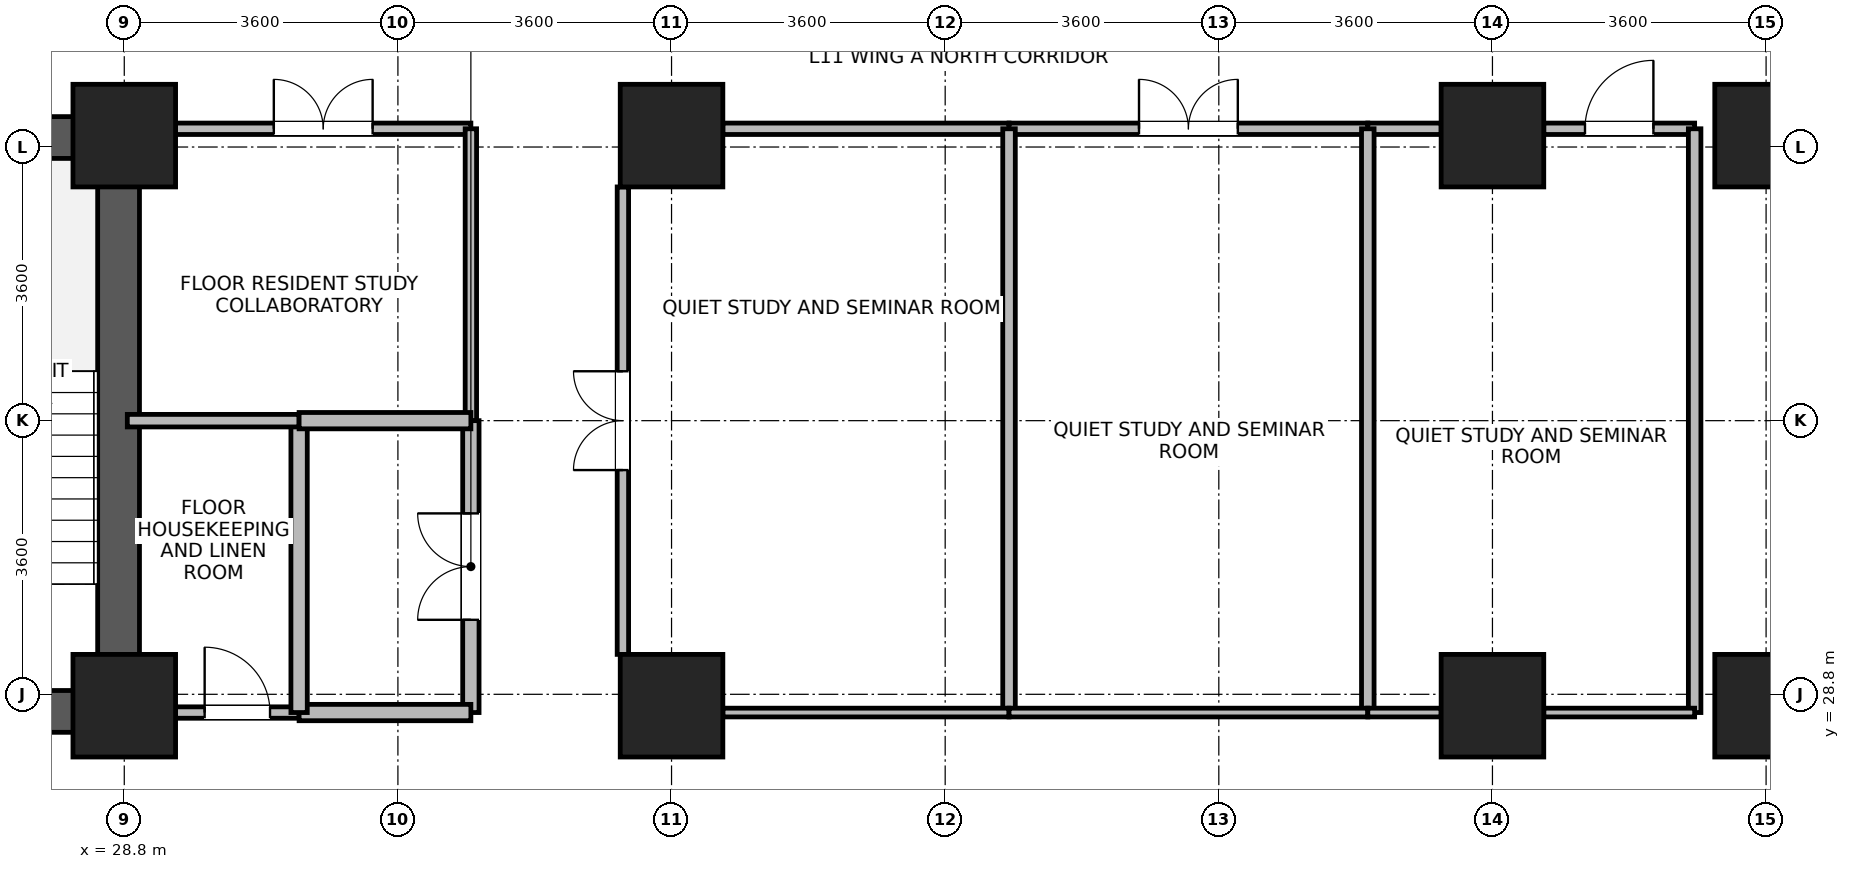
"""IFC4 building model, lengths in metres.
Left out: names, types, materials, properties, quantities, classifications, styles, units other than length and angle.
Written with IfcOpenShell. Run it as: python <this file> out.ifc"""

import sys

from ifc_helpers import new_model, si_unit, direction, frame, frame_2d, origin, origin_2d, place, context, subcontext, project, spatial, rectangle, extrude, source, transform, mapped, element, fill, save


model = new_model("IFC4")
c1 = context("Model", 3, precision=1e-05, world=origin(), true_north=direction((0.0, 1.0)))
c2 = subcontext(c1, "Body", "Model", "MODEL_VIEW")
j1 = project(units=[si_unit("LENGTHUNIT", "METRE"), si_unit("PLANEANGLEUNIT", "RADIAN")], contexts=[c1])
p1 = place(None, origin())
s1 = spatial("IfcSite", under=j1, at=p1, CompositionType="ELEMENT")
p2 = place(p1, origin())
s2 = spatial("IfcBuilding", under=s1, at=p2, CompositionType="ELEMENT")
p3 = place(p2, frame((0.0, 0.0, 47.5)))
s3 = spatial("IfcBuildingStorey", under=s2, at=p3, CompositionType="ELEMENT", Elevation=47.5)
p4 = place(p3, frame((28.725, 28.3, 0.0), z_axis=(0.0, 0.0, 1.0), x_axis=(0.0, 1.0, 0.0)))
e1 = element("IfcWall", 1, at=p4, inside=s3, PredefinedType="SHEAR", context=c2, shape_type="SweptSolid", body=[
    extrude(rectangle(XDim=8.1, YDim=0.55, at=frame_2d((4.05, 0.0))), origin(), (0.0, 0.0, 1.0), 3.45),
])
for number, where, z_axis, x_axis in (
    (2, (25.25, 28.575, 0.0), (0.0, 0.0, 1.0), (1.0, 0.0, 0.0)),
    (3, (25.25, 36.125, 0.0), (0.0, 0.0, 1.0), (1.0, 0.0, 0.0)),
):
    element("IfcWall", number, at=place(p3, frame(where, z_axis=z_axis, x_axis=x_axis)), inside=s3, PredefinedType="SHEAR", context=c2, shape_type="SweptSolid", body=[
        extrude(rectangle(XDim=3.2, YDim=0.55, at=frame_2d((1.6, 0.0))), origin(), (0.0, 0.0, 1.0), 3.45),
    ])
m1 = source(origin(), c2, "Body", "SweptSolid", [
    extrude(rectangle(XDim=1.35, YDim=1.35, at=origin_2d()), origin(), (0.0, 0.0, 1.0), 3.7),
])
for number, where, z_axis, x_axis in (
    (4, (28.8, 28.65, 0.0), (0.0, 0.0, 1.0), (1.0, 0.0, 0.0)),
    (5, (28.8, 36.15, 0.0), (0.0, 0.0, 1.0), (1.0, 0.0, 0.0)),
    (6, (36.0, 28.65, 0.0), (0.0, 0.0, 1.0), (1.0, 0.0, 0.0)),
    (7, (36.0, 36.15, 0.0), (0.0, 0.0, 1.0), (1.0, 0.0, 0.0)),
    (8, (46.8, 28.65, 0.0), (0.0, 0.0, 1.0), (1.0, 0.0, 0.0)),
    (9, (46.8, 36.15, 0.0), (0.0, 0.0, 1.0), (1.0, 0.0, 0.0)),
    (10, (50.4, 28.65, 0.0), (0.0, 0.0, 1.0), (1.0, 0.0, 0.0)),
    (11, (50.4, 36.15, 0.0), (0.0, 0.0, 1.0), (1.0, 0.0, 0.0)),
):
    element("IfcColumn", number, at=place(p3, frame(where, z_axis=z_axis, x_axis=x_axis)), inside=s3, PredefinedType="COLUMN", context=c2, shape_type="MappedRepresentation", body=[
        mapped(m1, transform((0.0, 0.0, 0.0), x_axis=(1.0, 0.0, 0.0), y_axis=(0.0, 1.0, 0.0), z_axis=(0.0, 0.0, 1.0), scale=1.0)),
    ])
p5 = place(p3, frame((35.36, 29.325, 0.0), z_axis=(0.0, 0.0, 1.0), x_axis=(0.0, 1.0, 0.0)))
e12 = element("IfcWall", 12, at=p5, inside=s3, PredefinedType="PARTITIONING", context=c2, shape_type="SweptSolid", body=[
    extrude(rectangle(XDim=6.15, YDim=0.15, at=frame_2d((3.075, 0.0))), origin(), (0.0, 0.0, 1.0), 3.43),
])
p6 = place(p5, frame((2.425, 0.0, 0.0)))
e13 = element("IfcOpeningElement", 13, at=p6, cuts=e12, PredefinedType="OPENING", context=c2, shape_type="SweptSolid", body=[
    extrude(rectangle(XDim=1.3, YDim=2.12, at=frame_2d((0.65, 1.06))), frame((0.0, 0.085, 0.0), z_axis=(0.0, -1.0, 0.0), x_axis=(1.0, 0.0, 0.0)), (0.0, 0.0, 1.0), 0.17),
])
p7 = place(p3, frame((36.675, 36.24, 0.0), z_axis=(0.0, 0.0, 1.0), x_axis=(1.0, 0.0, 0.0)))
e14 = element("IfcWall", 14, at=p7, inside=s3, PredefinedType="PARTITIONING", context=c2, shape_type="SweptSolid", body=[
    extrude(rectangle(XDim=3.765, YDim=0.15, at=frame_2d((1.882, 0.0))), origin(), (0.0, 0.0, 1.0), 2.78),
])
p8 = place(p3, frame((40.44, 36.24, 0.0), z_axis=(0.0, 0.0, 1.0), x_axis=(1.0, 0.0, 0.0)))
e15 = element("IfcWall", 15, at=p8, inside=s3, PredefinedType="PARTITIONING", context=c2, shape_type="SweptSolid", body=[
    extrude(rectangle(XDim=4.72, YDim=0.15, at=frame_2d((2.36, 0.0))), origin(), (0.0, 0.0, 1.0), 2.78),
])
p9 = place(p8, frame((1.71, 0.0, 0.0)))
e16 = element("IfcOpeningElement", 16, at=p9, cuts=e15, PredefinedType="OPENING", context=c2, shape_type="SweptSolid", body=[
    extrude(rectangle(XDim=1.3, YDim=2.12, at=frame_2d((0.65, 1.06))), frame((0.0, 0.085, 0.0), z_axis=(0.0, -1.0, 0.0), x_axis=(1.0, 0.0, 0.0)), (0.0, 0.0, 1.0), 0.17),
])
p10 = place(p3, frame((29.475, 36.24, 0.0), z_axis=(0.0, 0.0, 1.0), x_axis=(1.0, 0.0, 0.0)))
e17 = element("IfcWall", 17, at=p10, inside=s3, PredefinedType="PARTITIONING", context=c2, shape_type="SweptSolid", body=[
    extrude(rectangle(XDim=3.885, YDim=0.15, at=frame_2d((1.942, 0.0))), origin(), (0.0, 0.0, 1.0), 2.78),
])
p11 = place(p10, frame((1.292, 0.0, 0.0)))
e18 = element("IfcOpeningElement", 18, at=p11, cuts=e17, PredefinedType="OPENING", context=c2, shape_type="SweptSolid", body=[
    extrude(rectangle(XDim=1.3, YDim=2.12, at=frame_2d((0.65, 1.06))), frame((0.0, 0.085, 0.0), z_axis=(0.0, -1.0, 0.0), x_axis=(1.0, 0.0, 0.0)), (0.0, 0.0, 1.0), 0.17),
])
p12 = place(p3, frame((45.16, 36.24, 0.0), z_axis=(0.0, 0.0, 1.0), x_axis=(1.0, 0.0, 0.0)))
e19 = element("IfcWall", 19, at=p12, inside=s3, PredefinedType="PARTITIONING", context=c2, shape_type="SweptSolid", body=[
    extrude(rectangle(XDim=0.965, YDim=0.15, at=frame_2d((0.482, 0.0))), origin(), (0.0, 0.0, 1.0), 2.78),
])
p13 = place(p3, frame((47.475, 36.24, 0.0), z_axis=(0.0, 0.0, 1.0), x_axis=(1.0, 0.0, 0.0)))
e20 = element("IfcWall", 20, at=p13, inside=s3, PredefinedType="PARTITIONING", context=c2, shape_type="SweptSolid", body=[
    extrude(rectangle(XDim=1.985, YDim=0.15, at=frame_2d((0.992, 0.0))), origin(), (0.0, 0.0, 1.0), 2.78),
])
p14 = place(p13, frame((0.542, 0.0, 0.0)))
e21 = element("IfcOpeningElement", 21, at=p14, cuts=e20, PredefinedType="OPENING", context=c2, shape_type="SweptSolid", body=[
    extrude(rectangle(XDim=0.9, YDim=2.08, at=frame_2d((0.45, 1.04))), frame((0.0, 0.085, 0.0), z_axis=(0.0, -1.0, 0.0), x_axis=(1.0, 0.0, 0.0)), (0.0, 0.0, 1.0), 0.17),
])
p15 = place(p3, frame((33.36, 32.4, 0.0), z_axis=(0.0, 0.0, 1.0), x_axis=(0.0, 1.0, 0.0)))
e22 = element("IfcWall", 22, at=p15, inside=s3, PredefinedType="PARTITIONING", context=c2, shape_type="SweptSolid", body=[
    extrude(rectangle(XDim=3.84, YDim=0.15, at=frame_2d((1.92, 0.0))), origin(), (0.0, 0.0, 1.0), 3.43),
])
p16 = place(p3, frame((33.36, 28.56, 0.0), z_axis=(0.0, 0.0, 1.0), x_axis=(0.0, 1.0, 0.0)))
e23 = element("IfcWall", 23, at=p16, inside=s3, PredefinedType="PARTITIONING", context=c2, shape_type="SweptSolid", body=[
    extrude(rectangle(XDim=3.84, YDim=0.215, at=frame_2d((1.92, 0.0))), origin(), (0.0, 0.0, 1.0), 3.43),
])
p17 = place(p16, frame((1.22, 0.0, 0.0)))
e24 = element("IfcOpeningElement", 24, at=p17, cuts=e23, PredefinedType="OPENING", context=c2, shape_type="SweptSolid", body=[
    extrude(rectangle(XDim=1.4, YDim=2.15, at=frame_2d((0.7, 1.075))), frame((0.0, 0.118, 0.0), z_axis=(0.0, -1.0, 0.0), x_axis=(1.0, 0.0, 0.0)), (0.0, 0.0, 1.0), 0.235),
])
p18 = place(p3, frame((29.475, 28.56, 0.0), z_axis=(0.0, 0.0, 1.0), x_axis=(1.0, 0.0, 0.0)))
e25 = element("IfcWall", 25, at=p18, inside=s3, PredefinedType="PARTITIONING", context=c2, shape_type="SweptSolid", body=[
    extrude(rectangle(XDim=1.625, YDim=0.15, at=frame_2d((0.812, 0.0))), origin(), (0.0, 0.0, 1.0), 2.78),
])
p19 = place(p18, frame((0.383, 0.0, 0.0)))
e26 = element("IfcOpeningElement", 26, at=p19, cuts=e25, PredefinedType="OPENING", context=c2, shape_type="SweptSolid", body=[
    extrude(rectangle(XDim=0.86, YDim=2.02, at=frame_2d((0.43, 1.01))), frame((0.0, 0.085, 0.0), z_axis=(0.0, -1.0, 0.0), x_axis=(1.0, 0.0, 0.0)), (0.0, 0.0, 1.0), 0.17),
])
p20 = place(p3, frame((31.1, 28.56, 0.0), z_axis=(0.0, 0.0, 1.0), x_axis=(1.0, 0.0, 0.0)))
e27 = element("IfcWall", 27, at=p20, inside=s3, PredefinedType="PARTITIONING", context=c2, shape_type="SweptSolid", body=[
    extrude(rectangle(XDim=2.26, YDim=0.215, at=frame_2d((1.13, 0.0))), origin(), (0.0, 0.0, 1.0), 2.78),
])
for number, where, z_axis, x_axis in (
    (28, (40.44, 28.56, 0.0), (0.0, 0.0, 1.0), (0.0, 1.0, 0.0)),
    (29, (45.16, 28.56, 0.0), (0.0, 0.0, 1.0), (0.0, 1.0, 0.0)),
    (30, (49.46, 28.56, 0.0), (0.0, 0.0, 1.0), (0.0, 1.0, 0.0)),
):
    element("IfcWall", number, at=place(p3, frame(where, z_axis=z_axis, x_axis=x_axis)), inside=s3, PredefinedType="PARTITIONING", context=c2, shape_type="SweptSolid", body=[
        extrude(rectangle(XDim=7.68, YDim=0.165, at=frame_2d((3.84, 0.0))), origin(), (0.0, 0.0, 1.0), 3.43),
    ])
p21 = place(p3, frame((36.675, 28.56, 0.0), z_axis=(0.0, 0.0, 1.0), x_axis=(1.0, 0.0, 0.0)))
e31 = element("IfcWall", 31, at=p21, inside=s3, PredefinedType="PARTITIONING", context=c2, shape_type="SweptSolid", body=[
    extrude(rectangle(XDim=3.765, YDim=0.115, at=frame_2d((1.882, 0.0))), origin(), (0.0, 0.0, 1.0), 2.78),
])
p22 = place(p3, frame((40.44, 28.56, 0.0), z_axis=(0.0, 0.0, 1.0), x_axis=(1.0, 0.0, 0.0)))
e32 = element("IfcWall", 32, at=p22, inside=s3, PredefinedType="PARTITIONING", context=c2, shape_type="SweptSolid", body=[
    extrude(rectangle(XDim=4.72, YDim=0.115, at=frame_2d((2.36, 0.0))), origin(), (0.0, 0.0, 1.0), 2.78),
])
p23 = place(p3, frame((45.16, 28.56, 0.0), z_axis=(0.0, 0.0, 1.0), x_axis=(1.0, 0.0, 0.0)))
e33 = element("IfcWall", 33, at=p23, inside=s3, PredefinedType="PARTITIONING", context=c2, shape_type="SweptSolid", body=[
    extrude(rectangle(XDim=0.965, YDim=0.115, at=frame_2d((0.482, 0.0))), origin(), (0.0, 0.0, 1.0), 2.78),
])
p24 = place(p3, frame((47.475, 28.56, 0.0), z_axis=(0.0, 0.0, 1.0), x_axis=(1.0, 0.0, 0.0)))
e34 = element("IfcWall", 34, at=p24, inside=s3, PredefinedType="PARTITIONING", context=c2, shape_type="SweptSolid", body=[
    extrude(rectangle(XDim=1.985, YDim=0.115, at=frame_2d((0.992, 0.0))), origin(), (0.0, 0.0, 1.0), 2.78),
])
p25 = place(p3, frame((31.1, 28.56, 0.0), z_axis=(0.0, 0.0, 1.0), x_axis=(0.0, 1.0, 0.0)))
e35 = element("IfcWall", 35, at=p25, inside=s3, PredefinedType="PARTITIONING", context=c2, shape_type="SweptSolid", body=[
    extrude(rectangle(XDim=3.84, YDim=0.215, at=frame_2d((1.92, 0.0))), origin(), (0.0, 0.0, 1.0), 3.43),
])
p26 = place(p3, frame((28.84, 32.4, 0.0), z_axis=(0.0, 0.0, 1.0), x_axis=(1.0, 0.0, 0.0)))
e36 = element("IfcWall", 36, at=p26, inside=s3, PredefinedType="PARTITIONING", context=c2, shape_type="SweptSolid", body=[
    extrude(rectangle(XDim=2.26, YDim=0.165, at=frame_2d((1.13, 0.0))), origin(), (0.0, 0.0, 1.0), 3.43),
])
p27 = place(p3, frame((31.1, 32.4, 0.0), z_axis=(0.0, 0.0, 1.0), x_axis=(1.0, 0.0, 0.0)))
e37 = element("IfcWall", 37, at=p27, inside=s3, PredefinedType="PARTITIONING", context=c2, shape_type="SweptSolid", body=[
    extrude(rectangle(XDim=2.26, YDim=0.215, at=frame_2d((1.13, 0.0))), origin(), (0.0, 0.0, 1.0), 3.43),
])
p28 = place(p6, origin())
e38 = element("IfcDoor", 38, at=p28, inside=s3, OperationType="DOUBLE_DOOR_SINGLE_SWING", PredefinedType="DOOR", context=c2, shape_type="SweptSolid", body=[
    extrude(rectangle(XDim=1.3, YDim=2.12, at=frame_2d((0.65, 1.06))), frame((0.0, 0.025, 0.0), z_axis=(0.0, -1.0, 0.0), x_axis=(1.0, 0.0, 0.0)), (0.0, 0.0, 1.0), 0.05),
])
fill(e13, e38)
p29 = place(p9, origin())
e39 = element("IfcDoor", 39, at=p29, inside=s3, OperationType="DOUBLE_DOOR_SINGLE_SWING", PredefinedType="DOOR", context=c2, shape_type="SweptSolid", body=[
    extrude(rectangle(XDim=1.3, YDim=2.12, at=frame_2d((0.65, 1.06))), frame((0.0, 0.025, 0.0), z_axis=(0.0, -1.0, 0.0), x_axis=(1.0, 0.0, 0.0)), (0.0, 0.0, 1.0), 0.05),
])
fill(e16, e39)
p30 = place(p11, origin())
e40 = element("IfcDoor", 40, at=p30, inside=s3, OperationType="DOUBLE_DOOR_SINGLE_SWING", PredefinedType="DOOR", context=c2, shape_type="SweptSolid", body=[
    extrude(rectangle(XDim=1.3, YDim=2.12, at=frame_2d((0.65, 1.06))), frame((0.0, 0.025, 0.0), z_axis=(0.0, -1.0, 0.0), x_axis=(1.0, 0.0, 0.0)), (0.0, 0.0, 1.0), 0.05),
])
fill(e18, e40)
p31 = place(p14, origin())
e41 = element("IfcDoor", 41, at=p31, inside=s3, OperationType="SINGLE_SWING_RIGHT", PredefinedType="DOOR", context=c2, shape_type="SweptSolid", body=[
    extrude(rectangle(XDim=0.9, YDim=2.08, at=frame_2d((0.45, 1.04))), frame((0.0, 0.025, 0.0), z_axis=(0.0, -1.0, 0.0), x_axis=(1.0, 0.0, 0.0)), (0.0, 0.0, 1.0), 0.05),
])
fill(e21, e41)
p32 = place(p17, origin())
e42 = element("IfcDoor", 42, at=p32, inside=s3, OperationType="DOUBLE_DOOR_SINGLE_SWING", PredefinedType="DOOR", context=c2, shape_type="SweptSolid", body=[
    extrude(rectangle(XDim=1.4, YDim=2.15, at=frame_2d((0.7, 1.075))), frame((0.0, 0.025, 0.0), z_axis=(0.0, -1.0, 0.0), x_axis=(1.0, 0.0, 0.0)), (0.0, 0.0, 1.0), 0.05),
])
fill(e24, e42)
p33 = place(p19, origin())
e43 = element("IfcDoor", 43, at=p33, inside=s3, OperationType="SINGLE_SWING_LEFT", PredefinedType="DOOR", context=c2, shape_type="SweptSolid", body=[
    extrude(rectangle(XDim=0.86, YDim=2.02, at=frame_2d((0.43, 1.01))), frame((0.0, 0.025, 0.0), z_axis=(0.0, -1.0, 0.0), x_axis=(1.0, 0.0, 0.0)), (0.0, 0.0, 1.0), 0.05),
])
fill(e26, e43)
save(model, sys.argv[1])
